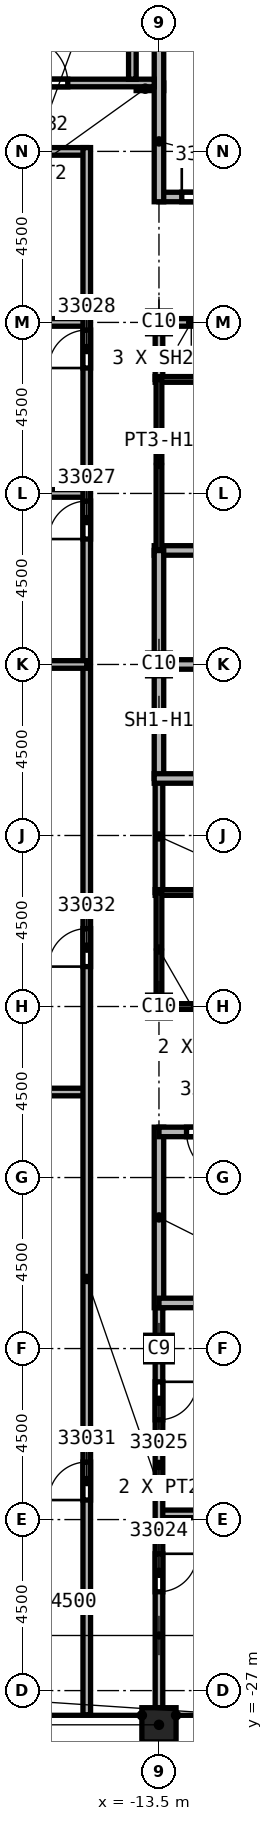
"""IFC4 building model, lengths in metres.
Left out: names, types, materials, properties, quantities, classifications, styles, units other than length and angle.
Written with IfcOpenShell. Run it as: python <this file> out.ifc"""

import sys

from ifc_helpers import new_model, si_unit, direction, frame, frame_2d, origin, origin_2d, place, context, subcontext, project, spatial, rectangle, extrude, element, fill, save


model = new_model("IFC4")
c1 = context("Model", 3, precision=1e-05, world=origin(), true_north=direction((0.0, 1.0)))
c2 = subcontext(c1, "Body", "Model", "MODEL_VIEW")
j1 = project(units=[si_unit("LENGTHUNIT", "METRE"), si_unit("PLANEANGLEUNIT", "RADIAN")], contexts=[c1])
p1 = place(None, origin())
s1 = spatial("IfcSite", under=j1, at=p1, CompositionType="ELEMENT")
p2 = place(p1, origin())
s2 = spatial("IfcBuilding", under=s1, at=p2, CompositionType="ELEMENT")
p3 = place(p2, frame((0.0, 0.0, 361.0)))
s3 = spatial("IfcBuildingStorey", under=s2, at=p3, CompositionType="ELEMENT", Elevation=361.0)
p4 = place(p3, frame((-13.5, -18.0, 0.0), z_axis=(0.0, 0.0, 1.0), x_axis=(1.0, 0.0, 0.0)))
e1 = element("IfcColumn", 1, at=p4, inside=s3, PredefinedType="COLUMN", context=c2, shape_type="SweptSolid", body=[
    extrude(rectangle(XDim=0.7, YDim=0.7, at=origin_2d()), origin(), (0.0, 0.0, 1.0), 4.6),
])
for number, where, z_axis, x_axis in (
    (2, (-13.5, 0.0, 0.0), (0.0, 0.0, 1.0), (1.0, 0.0, 0.0)),
    (3, (-13.5, 9.0, 0.0), (0.0, 0.0, 1.0), (1.0, 0.0, 0.0)),
    (4, (-13.5, -9.0, 0.0), (0.0, 0.0, 1.0), (1.0, 0.0, 0.0)),
):
    element("IfcColumn", number, at=place(p3, frame(where, z_axis=z_axis, x_axis=x_axis)), inside=s3, PredefinedType="COLUMN", context=c2, shape_type="SweptSolid", body=[
        extrude(rectangle(XDim=0.6, YDim=0.6, at=origin_2d()), origin(), (0.0, 0.0, 1.0), 4.6),
    ])
p5 = place(p3, frame((-13.5, -27.9, 0.0), z_axis=(0.0, 0.0, 1.0), x_axis=(1.0, 0.0, 0.0)))
e5 = element("IfcColumn", 5, at=p5, inside=s3, PredefinedType="COLUMN", context=c2, shape_type="SweptSolid", body=[
    extrude(rectangle(XDim=0.9, YDim=0.9, at=origin_2d()), origin(), (0.0, 0.0, 1.0), 4.6),
])
p6 = place(p3, frame((-26.736, -11.25, 0.0), z_axis=(0.0, 0.0, 1.0), x_axis=(1.0, 0.0, 0.0)))
e6 = element("IfcWall", 6, at=p6, inside=s3, PredefinedType="PARTITIONING", context=c2, shape_type="SweptSolid", body=[
    extrude(rectangle(XDim=11.336, YDim=0.2, at=frame_2d((5.668, 0.0))), origin(), (0.0, 0.0, 1.0), 4.15),
])
for number, where, z_axis, x_axis in (
    (7, (-26.55, 4.5, 0.0), (0.0, 0.0, 1.0), (1.0, 0.0, 0.0)),
    (8, (-26.55, 9.0, 0.0), (0.0, 0.0, 1.0), (1.0, 0.0, 0.0)),
):
    element("IfcWall", number, at=place(p3, frame(where, z_axis=z_axis, x_axis=x_axis)), inside=s3, PredefinedType="PARTITIONING", context=c2, shape_type="SweptSolid", body=[
        extrude(rectangle(XDim=11.15, YDim=0.2, at=frame_2d((5.575, 0.0))), origin(), (0.0, 0.0, 1.0), 4.15),
    ])
p7 = place(p3, frame((-15.4, 13.5, 0.0), z_axis=(0.0, 0.0, 1.0), x_axis=(-1.0, 0.0, 0.0)))
e9 = element("IfcWall", 9, at=p7, inside=s3, PredefinedType="PARTITIONING", context=c2, shape_type="SweptSolid", body=[
    extrude(rectangle(XDim=6.6, YDim=0.2, at=frame_2d((3.3, 0.0))), origin(), (0.0, 0.0, 1.0), 4.15),
])
p8 = place(p7, frame((3.1, 0.0, 0.0)))
e10 = element("IfcOpeningElement", 10, at=p8, cuts=e9, PredefinedType="OPENING", context=c2, shape_type="SweptSolid", body=[
    extrude(rectangle(XDim=1.0, YDim=2.1, at=frame_2d((0.5, 1.05))), frame((0.0, 0.1, 0.0), z_axis=(0.0, -1.0, 0.0), x_axis=(1.0, 0.0, 0.0)), (0.0, 0.0, 1.0), 0.2),
])
p9 = place(p3, frame((-15.4, -27.636, 0.0), z_axis=(0.0, 0.0, 1.0), x_axis=(0.0, 1.0, 0.0)))
e11 = element("IfcWall", 11, at=p9, inside=s3, PredefinedType="PARTITIONING", context=c2, shape_type="SweptSolid", body=[
    extrude(rectangle(XDim=41.236, YDim=0.2, at=frame_2d((20.618, 0.0))), origin(), (0.0, 0.0, 1.0), 4.15),
])
p10 = place(p9, frame((30.936, 0.0, 0.0)))
e12 = element("IfcOpeningElement", 12, at=p10, cuts=e11, PredefinedType="OPENING", context=c2, shape_type="SweptSolid", body=[
    extrude(rectangle(XDim=1.0, YDim=2.1, at=frame_2d((0.5, 1.05))), frame((0.0, 0.1, 0.0), z_axis=(0.0, -1.0, 0.0), x_axis=(1.0, 0.0, 0.0)), (0.0, 0.0, 1.0), 0.2),
])
p11 = place(p9, frame((35.436, 0.0, 0.0)))
e13 = element("IfcOpeningElement", 13, at=p11, cuts=e11, PredefinedType="OPENING", context=c2, shape_type="SweptSolid", body=[
    extrude(rectangle(XDim=1.0, YDim=2.1, at=frame_2d((0.5, 1.05))), frame((0.0, 0.1, 0.0), z_axis=(0.0, -1.0, 0.0), x_axis=(1.0, 0.0, 0.0)), (0.0, 0.0, 1.0), 0.2),
])
p12 = place(p9, frame((5.65, 0.0, 0.0)))
e14 = element("IfcOpeningElement", 14, at=p12, cuts=e11, PredefinedType="OPENING", context=c2, shape_type="SweptSolid", body=[
    extrude(rectangle(XDim=1.0, YDim=2.1, at=frame_2d((0.5, 1.05))), frame((0.0, 0.1, 0.0), z_axis=(0.0, -1.0, 0.0), x_axis=(1.0, 0.0, 0.0)), (0.0, 0.0, 1.0), 0.2),
])
p13 = place(p9, frame((19.686, 0.0, 0.0)))
e15 = element("IfcOpeningElement", 15, at=p13, cuts=e11, PredefinedType="OPENING", context=c2, shape_type="SweptSolid", body=[
    extrude(rectangle(XDim=1.0, YDim=2.1, at=frame_2d((0.5, 1.05))), frame((0.0, 0.1, 0.0), z_axis=(0.0, -1.0, 0.0), x_axis=(1.0, 0.0, 0.0)), (0.0, 0.0, 1.0), 0.2),
])
p14 = place(p3, frame((-15.4, 0.0, 0.0), z_axis=(0.0, 0.0, 1.0), x_axis=(-1.0, 0.0, 0.0)))
e16 = element("IfcWall", 16, at=p14, inside=s3, PredefinedType="PARTITIONING", context=c2, shape_type="SweptSolid", body=[
    extrude(rectangle(XDim=11.15, YDim=0.2, at=frame_2d((5.575, 0.0))), origin(), (0.0, 0.0, 1.0), 4.15),
])
p15 = place(p3, frame((-14.1, 15.2, 0.0), z_axis=(0.0, 0.0, 1.0), x_axis=(1.0, 0.0, 0.0)))
e17 = element("IfcWall", 17, at=p15, inside=s3, PredefinedType="PARTITIONING", context=c2, shape_type="SweptSolid", body=[
    extrude(rectangle(XDim=0.725, YDim=0.2, at=frame_2d((0.363, 0.0))), origin(), (0.0, 0.0, 1.0), 4.15),
])
p16 = place(p3, frame((-13.5, -22.35, 0.0), z_axis=(0.0, 0.0, 1.0), x_axis=(1.0, 0.0, 0.0)))
e18 = element("IfcWall", 18, at=p16, inside=s3, PredefinedType="PARTITIONING", context=c2, shape_type="SweptSolid", body=[
    extrude(rectangle(XDim=10.6, YDim=0.2, at=frame_2d((5.3, 0.0))), origin(), (0.0, 0.0, 1.0), 4.15),
])
p17 = place(p3, frame((-13.5, -16.675, 0.0), z_axis=(0.0, 0.0, 1.0), x_axis=(0.0, -1.0, 0.0)))
e19 = element("IfcWall", 19, at=p17, inside=s3, PredefinedType="PARTITIONING", context=c2, shape_type="SweptSolid", body=[
    extrude(rectangle(XDim=10.775, YDim=0.2, at=frame_2d((5.387, 0.0))), origin(), (0.0, 0.0, 1.0), 4.15),
])
p18 = place(p17, frame((6.725, 0.0, 0.0)))
e20 = element("IfcOpeningElement", 20, at=p18, cuts=e19, PredefinedType="OPENING", context=c2, shape_type="SweptSolid", body=[
    extrude(rectangle(XDim=1.0, YDim=2.1, at=frame_2d((0.5, 1.05))), frame((0.0, 0.1, 0.0), z_axis=(0.0, -1.0, 0.0), x_axis=(1.0, 0.0, 0.0)), (0.0, 0.0, 1.0), 0.2),
])
p19 = place(p17, frame((2.2, 0.0, 0.0)))
e21 = element("IfcOpeningElement", 21, at=p19, cuts=e19, PredefinedType="OPENING", context=c2, shape_type="SweptSolid", body=[
    extrude(rectangle(XDim=1.0, YDim=2.1, at=frame_2d((0.5, 1.05))), frame((0.0, 0.1, 0.0), z_axis=(0.0, -1.0, 0.0), x_axis=(1.0, 0.0, 0.0)), (0.0, 0.0, 1.0), 0.2),
])
p20 = place(p3, frame((-13.5, -6.0, 0.0), z_axis=(0.0, 0.0, 1.0), x_axis=(0.0, 1.0, 0.0)))
e22 = element("IfcWall", 22, at=p20, inside=s3, PredefinedType="SOLIDWALL", context=c2, shape_type="SweptSolid", body=[
    extrude(rectangle(XDim=3.0, YDim=0.2, at=frame_2d((1.5, 0.0))), origin(), (0.0, 0.0, 1.0), 3.838),
])
p21 = place(p3, frame((-13.5, 7.5, 0.0), z_axis=(0.0, 0.0, 1.0), x_axis=(0.0, 1.0, 0.0)))
e23 = element("IfcWall", 23, at=p21, inside=s3, PredefinedType="SOLIDWALL", context=c2, shape_type="SweptSolid", body=[
    extrude(rectangle(XDim=1.6, YDim=0.2, at=frame_2d((0.8, 0.0))), origin(), (0.0, 0.0, 1.0), 3.838),
])
p22 = place(p3, frame((-13.5, 9.0, 0.0), z_axis=(0.0, 0.0, 1.0), x_axis=(1.0, 0.0, 0.0)))
e24 = element("IfcWall", 24, at=p22, inside=s3, PredefinedType="SOLIDWALL", context=c2, shape_type="SweptSolid", body=[
    extrude(rectangle(XDim=3.0, YDim=0.2, at=frame_2d((1.5, 0.0))), origin(), (0.0, 0.0, 1.0), 3.838),
])
p23 = place(p22, frame((1.6, 0.0, 0.0)))
e25 = element("IfcOpeningElement", 25, at=p23, cuts=e24, PredefinedType="OPENING", context=c2, shape_type="SweptSolid", body=[
    extrude(rectangle(XDim=1.1, YDim=2.1, at=frame_2d((0.55, 1.05))), frame((0.0, 0.1, 0.0), z_axis=(0.0, -1.0, 0.0), x_axis=(1.0, 0.0, 0.0)), (0.0, 0.0, 1.0), 0.2),
])
p24 = place(p3, frame((-13.625, 0.0, 0.0), z_axis=(0.0, 0.0, 1.0), x_axis=(1.0, 0.0, 0.0)))
e26 = element("IfcWall", 26, at=p24, inside=s3, PredefinedType="SOLIDWALL", context=c2, shape_type="SweptSolid", body=[
    extrude(rectangle(XDim=3.125, YDim=0.25, at=frame_2d((1.562, 0.0))), origin(), (0.0, 0.0, 1.0), 4.15),
])
p25 = place(p3, frame((-13.625, 3.0, 0.0), z_axis=(0.0, 0.0, 1.0), x_axis=(1.0, 0.0, 0.0)))
e27 = element("IfcWall", 27, at=p25, inside=s3, PredefinedType="SOLIDWALL", context=c2, shape_type="SweptSolid", body=[
    extrude(rectangle(XDim=6.125, YDim=0.25, at=frame_2d((3.062, 0.0))), origin(), (0.0, 0.0, 1.0), 4.15),
])
p26 = place(p25, frame((4.75, 0.0, 0.0)))
e28 = element("IfcOpeningElement", 28, at=p26, cuts=e27, PredefinedType="OPENING", context=c2, shape_type="SweptSolid", body=[
    extrude(rectangle(XDim=1.1, YDim=2.1, at=frame_2d((0.55, 1.05))), frame((0.0, 0.125, 0.0), z_axis=(0.0, -1.0, 0.0), x_axis=(1.0, 0.0, 0.0)), (0.0, 0.0, 1.0), 0.25),
])
p27 = place(p3, frame((-13.5, -3.0, 0.0), z_axis=(0.0, 0.0, 1.0), x_axis=(0.0, 1.0, 0.0)))
e29 = element("IfcWall", 29, at=p27, inside=s3, PredefinedType="SOLIDWALL", context=c2, shape_type="SweptSolid", body=[
    extrude(rectangle(XDim=6.0, YDim=0.25, at=frame_2d((3.0, 0.0))), origin(), (0.0, 0.0, 1.0), 3.838),
])
p28 = place(p3, frame((-13.625, -3.0, 0.0), z_axis=(0.0, 0.0, 1.0), x_axis=(1.0, 0.0, 0.0)))
e30 = element("IfcWall", 30, at=p28, inside=s3, PredefinedType="SOLIDWALL", context=c2, shape_type="SweptSolid", body=[
    extrude(rectangle(XDim=6.125, YDim=0.25, at=frame_2d((3.062, 0.0))), origin(), (0.0, 0.0, 1.0), 4.15),
])
p29 = place(p28, frame((4.75, 0.0, 0.0)))
e31 = element("IfcOpeningElement", 31, at=p29, cuts=e30, PredefinedType="OPENING", context=c2, shape_type="SweptSolid", body=[
    extrude(rectangle(XDim=1.1, YDim=2.1, at=frame_2d((0.55, 1.05))), frame((0.0, 0.125, 0.0), z_axis=(0.0, -1.0, 0.0), x_axis=(1.0, 0.0, 0.0)), (0.0, 0.0, 1.0), 0.25),
])
p30 = place(p3, frame((-13.5, -12.175, 0.0), z_axis=(0.0, 0.0, 1.0), x_axis=(0.0, -1.0, 0.0)))
e32 = element("IfcWall", 32, at=p30, inside=s3, PredefinedType="SOLIDWALL", context=c2, shape_type="SweptSolid", body=[
    extrude(rectangle(XDim=4.75, YDim=0.25, at=frame_2d((2.375, 0.0))), origin(), (0.0, 0.0, 1.0), 4.15),
])
p31 = place(p3, frame((-13.5, 12.3, 0.0), z_axis=(0.0, 0.0, 1.0), x_axis=(1.0, 0.0, 0.0)))
e33 = element("IfcWall", 33, at=p31, inside=s3, PredefinedType="SOLIDWALL", context=c2, shape_type="SweptSolid", body=[
    extrude(rectangle(XDim=9.125, YDim=0.25, at=frame_2d((4.562, 0.0))), origin(), (0.0, 0.0, 1.0), 4.15),
])
p32 = place(p31, frame((0.6, 0.0, 0.0)))
e34 = element("IfcOpeningElement", 34, at=p32, cuts=e33, PredefinedType="OPENING", context=c2, shape_type="SweptSolid", body=[
    extrude(rectangle(XDim=1.2, YDim=2.1, at=frame_2d((0.6, 1.05))), frame((0.0, 0.125, 0.0), z_axis=(0.0, -1.0, 0.0), x_axis=(1.0, 0.0, 0.0)), (0.0, 0.0, 1.0), 0.25),
])
p33 = place(p3, frame((-13.5, 12.175, 0.0), z_axis=(0.0, 0.0, 1.0), x_axis=(0.0, 1.0, 0.0)))
e35 = element("IfcWall", 35, at=p33, inside=s3, PredefinedType="SOLIDWALL", context=c2, shape_type="SweptSolid", body=[
    extrude(rectangle(XDim=4.75, YDim=0.25, at=frame_2d((2.375, 0.0))), origin(), (0.0, 0.0, 1.0), 4.15),
])
p34 = place(p3, frame((-4.4, -16.8, 0.0), z_axis=(0.0, 0.0, 1.0), x_axis=(-1.0, 0.0, 0.0)))
e36 = element("IfcWall", 36, at=p34, inside=s3, PredefinedType="SOLIDWALL", context=c2, shape_type="SweptSolid", body=[
    extrude(rectangle(XDim=9.1, YDim=0.25, at=frame_2d((4.55, 0.0))), origin(), (0.0, 0.0, 1.0), 4.15),
])
p35 = place(p3, frame((-4.375, -12.3, 0.0), z_axis=(0.0, 0.0, 1.0), x_axis=(-1.0, 0.0, 0.0)))
e37 = element("IfcWall", 37, at=p35, inside=s3, PredefinedType="SOLIDWALL", context=c2, shape_type="SweptSolid", body=[
    extrude(rectangle(XDim=9.125, YDim=0.25, at=frame_2d((4.562, 0.0))), origin(), (0.0, 0.0, 1.0), 4.15),
])
p36 = place(p35, frame((7.2, 0.0, 0.0)))
e38 = element("IfcOpeningElement", 38, at=p36, cuts=e37, PredefinedType="OPENING", context=c2, shape_type="SweptSolid", body=[
    extrude(rectangle(XDim=1.2, YDim=2.1, at=frame_2d((0.6, 1.05))), frame((0.0, 0.125, 0.0), z_axis=(0.0, -1.0, 0.0), x_axis=(1.0, 0.0, 0.0)), (0.0, 0.0, 1.0), 0.25),
])
for number, where, z_axis, x_axis in (
    (39, (-13.6, -6.0, 0.0), (0.0, 0.0, 1.0), (1.0, 0.0, 0.0)),
    (40, (-13.6, 7.5, 0.0), (0.0, 0.0, 1.0), (1.0, 0.0, 0.0)),
):
    element("IfcWall", number, at=place(p3, frame(where, z_axis=z_axis, x_axis=x_axis)), inside=s3, PredefinedType="PARTITIONING", context=c2, shape_type="SweptSolid", body=[
        extrude(rectangle(XDim=3.1, YDim=0.15, at=frame_2d((1.55, 0.0))), origin(), (0.0, 0.0, 1.0), 4.15),
    ])
p37 = place(p3, frame((-13.5, -9.075, 0.0), z_axis=(0.0, 0.0, 1.0), x_axis=(0.0, 1.0, 0.0)))
e41 = element("IfcWall", 41, at=p37, inside=s3, PredefinedType="PARTITIONING", context=c2, shape_type="SweptSolid", body=[
    extrude(rectangle(XDim=3.075, YDim=0.15, at=frame_2d((1.538, 0.0))), origin(), (0.0, 0.0, 1.0), 3.838),
])
p38 = place(p3, frame((-13.5, 3.0, 0.0), z_axis=(0.0, 0.0, 1.0), x_axis=(0.0, 1.0, 0.0)))
e42 = element("IfcWall", 42, at=p38, inside=s3, PredefinedType="PARTITIONING", context=c2, shape_type="SweptSolid", body=[
    extrude(rectangle(XDim=4.5, YDim=0.15, at=frame_2d((2.25, 0.0))), origin(), (0.0, 0.0, 1.0), 3.838),
])
p39 = place(p3, frame((-10.5, -9.0, 0.0), z_axis=(0.0, 0.0, 1.0), x_axis=(-1.0, 0.0, 0.0)))
e43 = element("IfcWall", 43, at=p39, inside=s3, PredefinedType="PARTITIONING", context=c2, shape_type="SweptSolid", body=[
    extrude(rectangle(XDim=3.0, YDim=0.15, at=frame_2d((1.5, 0.0))), origin(), (0.0, 0.0, 1.0), 3.838),
])
p40 = place(p3, frame((-21.9, 15.3, 0.0), z_axis=(0.0, 0.0, 1.0), x_axis=(1.0, 0.0, 0.0)))
e44 = element("IfcWall", 44, at=p40, inside=s3, PredefinedType="SOLIDWALL", context=c2, shape_type="SweptSolid", body=[
    extrude(rectangle(XDim=8.275, YDim=0.2, at=frame_2d((4.137, 0.0))), origin(), (0.0, 0.0, 1.0), 4.15),
])
p41 = place(p40, frame((4.8, 0.0, 0.0)))
e45 = element("IfcOpeningElement", 45, at=p41, cuts=e44, PredefinedType="OPENING", context=c2, shape_type="SweptSolid", body=[
    extrude(rectangle(XDim=1.2, YDim=2.1, at=frame_2d((0.6, 1.05))), frame((0.0, 0.1, 0.0), z_axis=(0.0, -1.0, 0.0), x_axis=(1.0, 0.0, 0.0)), (0.0, 0.0, 1.0), 0.2),
])
p42 = place(p3, frame((-14.2, 15.4, 0.0), z_axis=(0.0, 0.0, 1.0), x_axis=(0.0, 1.0, 0.0)))
e46 = element("IfcWall", 46, at=p42, inside=s3, PredefinedType="SOLIDWALL", context=c2, shape_type="SweptSolid", body=[
    extrude(rectangle(XDim=5.9, YDim=0.2, at=frame_2d((2.95, 0.0))), origin(), (0.0, 0.0, 1.0), 4.15),
])
p43 = place(p32, origin())
e47 = element("IfcDoor", 47, at=p43, inside=s3, OperationType="SINGLE_SWING_LEFT", PredefinedType="DOOR", context=c2, shape_type="SweptSolid", body=[
    extrude(rectangle(XDim=1.2, YDim=2.1, at=frame_2d((0.6, 1.05))), frame((0.0, 0.025, 0.0), z_axis=(0.0, -1.0, 0.0), x_axis=(1.0, 0.0, 0.0)), (0.0, 0.0, 1.0), 0.05),
])
fill(e34, e47)
p44 = place(p36, origin())
e48 = element("IfcDoor", 48, at=p44, inside=s3, OperationType="SINGLE_SWING_RIGHT", PredefinedType="DOOR", context=c2, shape_type="SweptSolid", body=[
    extrude(rectangle(XDim=1.2, YDim=2.1, at=frame_2d((0.6, 1.05))), frame((0.0, 0.025, 0.0), z_axis=(0.0, -1.0, 0.0), x_axis=(1.0, 0.0, 0.0)), (0.0, 0.0, 1.0), 0.05),
])
fill(e38, e48)
p45 = place(p18, origin())
e49 = element("IfcDoor", 49, at=p45, inside=s3, OperationType="SINGLE_SWING_LEFT", PredefinedType="DOOR", context=c2, shape_type="SweptSolid", body=[
    extrude(rectangle(XDim=1.0, YDim=2.1, at=frame_2d((0.5, 1.05))), frame((0.0, 0.025, 0.0), z_axis=(0.0, -1.0, 0.0), x_axis=(1.0, 0.0, 0.0)), (0.0, 0.0, 1.0), 0.05),
])
fill(e20, e49)
p46 = place(p19, origin())
e50 = element("IfcDoor", 50, at=p46, inside=s3, OperationType="SINGLE_SWING_RIGHT", PredefinedType="DOOR", context=c2, shape_type="SweptSolid", body=[
    extrude(rectangle(XDim=1.0, YDim=2.1, at=frame_2d((0.5, 1.05))), frame((0.0, 0.025, 0.0), z_axis=(0.0, -1.0, 0.0), x_axis=(1.0, 0.0, 0.0)), (0.0, 0.0, 1.0), 0.05),
])
fill(e21, e50)
p47 = place(p10, origin())
e51 = element("IfcDoor", 51, at=p47, inside=s3, OperationType="SINGLE_SWING_RIGHT", PredefinedType="DOOR", context=c2, shape_type="SweptSolid", body=[
    extrude(rectangle(XDim=1.0, YDim=2.1, at=frame_2d((0.5, 1.05))), frame((0.0, 0.025, 0.0), z_axis=(0.0, -1.0, 0.0), x_axis=(1.0, 0.0, 0.0)), (0.0, 0.0, 1.0), 0.05),
])
fill(e12, e51)
p48 = place(p11, origin())
e52 = element("IfcDoor", 52, at=p48, inside=s3, OperationType="SINGLE_SWING_LEFT", PredefinedType="DOOR", context=c2, shape_type="SweptSolid", body=[
    extrude(rectangle(XDim=1.0, YDim=2.1, at=frame_2d((0.5, 1.05))), frame((0.0, 0.025, 0.0), z_axis=(0.0, -1.0, 0.0), x_axis=(1.0, 0.0, 0.0)), (0.0, 0.0, 1.0), 0.05),
])
fill(e13, e52)
p49 = place(p12, origin())
e53 = element("IfcDoor", 53, at=p49, inside=s3, OperationType="SINGLE_SWING_RIGHT", PredefinedType="DOOR", context=c2, shape_type="SweptSolid", body=[
    extrude(rectangle(XDim=1.0, YDim=2.1, at=frame_2d((0.5, 1.05))), frame((0.0, 0.025, 0.0), z_axis=(0.0, -1.0, 0.0), x_axis=(1.0, 0.0, 0.0)), (0.0, 0.0, 1.0), 0.05),
])
fill(e14, e53)
p50 = place(p13, origin())
e54 = element("IfcDoor", 54, at=p50, inside=s3, OperationType="SINGLE_SWING_LEFT", PredefinedType="DOOR", context=c2, shape_type="SweptSolid", body=[
    extrude(rectangle(XDim=1.0, YDim=2.1, at=frame_2d((0.5, 1.05))), frame((0.0, 0.025, 0.0), z_axis=(0.0, -1.0, 0.0), x_axis=(1.0, 0.0, 0.0)), (0.0, 0.0, 1.0), 0.05),
])
fill(e15, e54)
p51 = place(p41, origin())
e55 = element("IfcDoor", 55, at=p51, inside=s3, OperationType="SINGLE_SWING_RIGHT", PredefinedType="DOOR", context=c2, shape_type="SweptSolid", body=[
    extrude(rectangle(XDim=1.2, YDim=2.1, at=frame_2d((0.6, 1.05))), frame((0.0, 0.025, 0.0), z_axis=(0.0, -1.0, 0.0), x_axis=(1.0, 0.0, 0.0)), (0.0, 0.0, 1.0), 0.05),
])
fill(e45, e55)
save(model, sys.argv[1])
